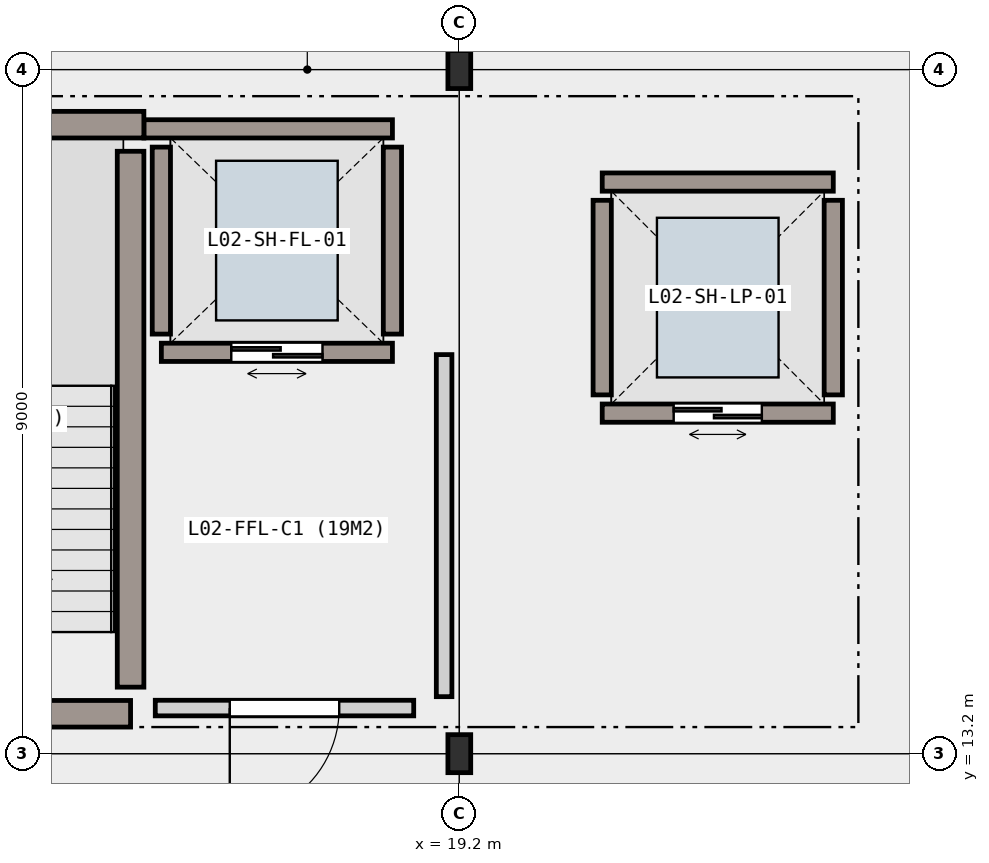
"""IFC4 building model, lengths in metres.
Left out: names, types, materials, properties, quantities, classifications, styles, units other than length and angle.
Written with IfcOpenShell. Run it as: python <this file> out.ifc"""

import sys

from ifc_helpers import new_model, si_unit, direction, frame, frame_2d, origin, origin_2d, place, context, subcontext, project, spatial, rectangle, i_section, extrude, element, fill, save


model = new_model("IFC4")
c1 = context("Model", 3, precision=1e-05, world=origin(), true_north=direction((0.0, 1.0)))
c2 = subcontext(c1, "Body", "Model", "MODEL_VIEW")
j1 = project(units=[si_unit("LENGTHUNIT", "METRE"), si_unit("PLANEANGLEUNIT", "RADIAN")], contexts=[c1])
p1 = place(None, origin())
s1 = spatial("IfcSite", under=j1, at=p1, CompositionType="ELEMENT")
p2 = place(p1, origin())
s2 = spatial("IfcBuilding", under=s1, at=p2, CompositionType="ELEMENT")
p3 = place(p2, frame((0.0, 0.0, 10.2)))
s3 = spatial("IfcBuildingStorey", under=s2, at=p3, CompositionType="ELEMENT", Elevation=10.2)
for number, where, z_axis, x_axis in (
    (1, (19.2, 13.2, 0.0), (0.0, 0.0, 1.0), (1.0, 0.0, 0.0)),
    (2, (19.2, 22.2, 0.0), (0.0, 0.0, 1.0), (1.0, 0.0, 0.0)),
):
    element("IfcColumn", number, at=place(p3, frame(where, z_axis=z_axis, x_axis=x_axis)), inside=s3, PredefinedType="COLUMN", context=c2, shape_type="SweptSolid", body=[
        extrude(i_section(OverallWidth=0.3, OverallDepth=0.5, WebThickness=0.014, FlangeThickness=0.028, FilletRadius=0.027, at=origin_2d()), origin(), (0.0, 0.0, 1.0), 4.2),
    ])
p4 = place(p3, frame((18.32, 18.48, 0.0), z_axis=(0.0, 0.0, 1.0), x_axis=(-1.0, 0.0, 0.0)))
e3 = element("IfcWall", 3, at=p4, inside=s3, PredefinedType="SHEAR", context=c2, shape_type="SweptSolid", body=[
    extrude(rectangle(XDim=3.04, YDim=0.24, at=frame_2d((1.52, 0.0))), origin(), (0.0, 0.0, 1.0), 3.95),
])
p5 = place(p4, frame((0.92, 0.0, 0.0)))
e4 = element("IfcOpeningElement", 4, at=p5, cuts=e3, PredefinedType="OPENING", context=c2, shape_type="SweptSolid", body=[
    extrude(rectangle(XDim=1.2, YDim=2.15, at=frame_2d((0.6, 1.075))), frame((0.0, 0.13, 0.0), z_axis=(0.0, -1.0, 0.0), x_axis=(1.0, 0.0, 0.0)), (0.0, 0.0, 1.0), 0.26),
])
p6 = place(p3, frame((15.05, 21.42, 0.0), z_axis=(0.0, 0.0, 1.0), x_axis=(1.0, 0.0, 0.0)))
e5 = element("IfcWall", 5, at=p6, inside=s3, PredefinedType="SHEAR", context=c2, shape_type="SweptSolid", body=[
    extrude(rectangle(XDim=3.27, YDim=0.24, at=frame_2d((1.635, 0.0))), origin(), (0.0, 0.0, 1.0), 3.95),
])
for number, where, z_axis, x_axis in (
    (6, (15.28, 18.72, 0.0), (0.0, 0.0, 1.0), (0.0, 1.0, 0.0)),
    (7, (18.32, 21.18, 0.0), (0.0, 0.0, 1.0), (0.0, -1.0, 0.0)),
):
    element("IfcWall", number, at=place(p3, frame(where, z_axis=z_axis, x_axis=x_axis)), inside=s3, PredefinedType="SHEAR", context=c2, shape_type="SweptSolid", body=[
        extrude(rectangle(XDim=2.46, YDim=0.24, at=frame_2d((1.23, 0.0))), origin(), (0.0, 0.0, 1.0), 3.95),
    ])
p7 = place(p3, frame((24.12, 17.68, 0.0), z_axis=(0.0, 0.0, 1.0), x_axis=(-1.0, 0.0, 0.0)))
e8 = element("IfcWall", 8, at=p7, inside=s3, PredefinedType="SHEAR", context=c2, shape_type="SweptSolid", body=[
    extrude(rectangle(XDim=3.04, YDim=0.24, at=frame_2d((1.52, 0.0))), origin(), (0.0, 0.0, 1.0), 3.95),
])
p8 = place(p7, frame((0.94, 0.0, 0.0)))
e9 = element("IfcOpeningElement", 9, at=p8, cuts=e8, PredefinedType="OPENING", context=c2, shape_type="SweptSolid", body=[
    extrude(rectangle(XDim=1.16, YDim=2.15, at=frame_2d((0.58, 1.075))), frame((0.0, 0.13, 0.0), z_axis=(0.0, -1.0, 0.0), x_axis=(1.0, 0.0, 0.0)), (0.0, 0.0, 1.0), 0.26),
])
p9 = place(p3, frame((21.08, 20.72, 0.0), z_axis=(0.0, 0.0, 1.0), x_axis=(1.0, 0.0, 0.0)))
e10 = element("IfcWall", 10, at=p9, inside=s3, PredefinedType="SHEAR", context=c2, shape_type="SweptSolid", body=[
    extrude(rectangle(XDim=3.04, YDim=0.24, at=frame_2d((1.52, 0.0))), origin(), (0.0, 0.0, 1.0), 3.95),
])
for number, where, z_axis, x_axis in (
    (11, (21.08, 17.92, 0.0), (0.0, 0.0, 1.0), (0.0, 1.0, 0.0)),
    (12, (24.12, 20.48, 0.0), (0.0, 0.0, 1.0), (0.0, -1.0, 0.0)),
):
    element("IfcWall", number, at=place(p3, frame(where, z_axis=z_axis, x_axis=x_axis)), inside=s3, PredefinedType="SHEAR", context=c2, shape_type="SweptSolid", body=[
        extrude(rectangle(XDim=2.56, YDim=0.24, at=frame_2d((1.28, 0.0))), origin(), (0.0, 0.0, 1.0), 3.95),
    ])
p10 = place(p3, frame((14.875, 13.725, 0.0), z_axis=(0.0, 0.0, 1.0), x_axis=(-1.0, 0.0, 0.0)))
e13 = element("IfcWall", 13, at=p10, inside=s3, PredefinedType="SHEAR", context=c2, shape_type="SweptSolid", body=[
    extrude(rectangle(XDim=4.65, YDim=0.35, at=frame_2d((2.325, 0.0))), origin(), (0.0, 0.0, 1.0), 3.95),
])
p11 = place(p10, frame((1.665, 0.0, 0.0)))
e14 = element("IfcOpeningElement", 14, at=p11, cuts=e13, PredefinedType="OPENING", context=c2, shape_type="SweptSolid", body=[
    extrude(rectangle(XDim=1.32, YDim=2.15, at=frame_2d((0.66, 1.075))), frame((0.0, 0.185, 0.0), z_axis=(0.0, -1.0, 0.0), x_axis=(1.0, 0.0, 0.0)), (0.0, 0.0, 1.0), 0.37),
])
p12 = place(p3, frame((10.225, 21.475, 0.0), z_axis=(0.0, 0.0, 1.0), x_axis=(1.0, 0.0, 0.0)))
e15 = element("IfcWall", 15, at=p12, inside=s3, PredefinedType="SHEAR", context=c2, shape_type="SweptSolid", body=[
    extrude(rectangle(XDim=4.825, YDim=0.35, at=frame_2d((2.413, 0.0))), origin(), (0.0, 0.0, 1.0), 3.95),
])
p13 = place(p3, frame((14.875, 21.125, 0.0), z_axis=(0.0, 0.0, 1.0), x_axis=(0.0, -1.0, 0.0)))
e16 = element("IfcWall", 16, at=p13, inside=s3, PredefinedType="SHEAR", context=c2, shape_type="SweptSolid", body=[
    extrude(rectangle(XDim=7.05, YDim=0.35, at=frame_2d((3.525, 0.0))), origin(), (0.0, 0.0, 1.0), 3.95),
])
p14 = place(p3, frame((18.6, 13.8, 0.0), z_axis=(0.0, 0.0, 1.0), x_axis=(-1.0, 0.0, 0.0)))
e17 = element("IfcWall", 17, at=p14, inside=s3, PredefinedType="PARTITIONING", context=c2, shape_type="SweptSolid", body=[
    extrude(rectangle(XDim=3.4, YDim=0.205, at=frame_2d((1.7, 0.0))), origin(), (0.0, 0.0, 1.0), 3.95),
])
p15 = place(p14, frame((0.98, 0.0, 0.0)))
e18 = element("IfcOpeningElement", 18, at=p15, cuts=e17, PredefinedType="OPENING", context=c2, shape_type="SweptSolid", body=[
    extrude(rectangle(XDim=1.44, YDim=2.18, at=frame_2d((0.72, 1.09))), frame((0.0, 0.113, 0.0), z_axis=(0.0, -1.0, 0.0), x_axis=(1.0, 0.0, 0.0)), (0.0, 0.0, 1.0), 0.225),
])
p16 = place(p3, frame((19.0, 18.45, 0.0), z_axis=(0.0, 0.0, 1.0), x_axis=(0.0, -1.0, 0.0)))
e19 = element("IfcWall", 19, at=p16, inside=s3, PredefinedType="PARTITIONING", context=c2, shape_type="SweptSolid", body=[
    extrude(rectangle(XDim=4.5, YDim=0.205, at=frame_2d((2.25, 0.0))), origin(), (0.0, 0.0, 1.0), 3.37),
])
p17 = place(p5, origin())
e20 = element("IfcDoor", 20, at=p17, inside=s3, OperationType="DOUBLE_DOOR_SLIDING", PredefinedType="DOOR", context=c2, shape_type="SweptSolid", body=[
    extrude(rectangle(XDim=1.2, YDim=2.15, at=frame_2d((0.6, 1.075))), frame((0.0, 0.025, 0.0), z_axis=(0.0, -1.0, 0.0), x_axis=(1.0, 0.0, 0.0)), (0.0, 0.0, 1.0), 0.05),
])
fill(e4, e20)
p18 = place(p8, origin())
e21 = element("IfcDoor", 21, at=p18, inside=s3, OperationType="DOUBLE_DOOR_SLIDING", PredefinedType="DOOR", context=c2, shape_type="SweptSolid", body=[
    extrude(rectangle(XDim=1.16, YDim=2.15, at=frame_2d((0.58, 1.075))), frame((0.0, 0.025, 0.0), z_axis=(0.0, -1.0, 0.0), x_axis=(1.0, 0.0, 0.0)), (0.0, 0.0, 1.0), 0.05),
])
fill(e9, e21)
p19 = place(p15, origin())
e22 = element("IfcDoor", 22, at=p19, inside=s3, OperationType="SINGLE_SWING_RIGHT", PredefinedType="DOOR", context=c2, shape_type="SweptSolid", body=[
    extrude(rectangle(XDim=1.44, YDim=2.18, at=frame_2d((0.72, 1.09))), frame((0.0, 0.025, 0.0), z_axis=(0.0, -1.0, 0.0), x_axis=(1.0, 0.0, 0.0)), (0.0, 0.0, 1.0), 0.05),
])
fill(e18, e22)
save(model, sys.argv[1])
